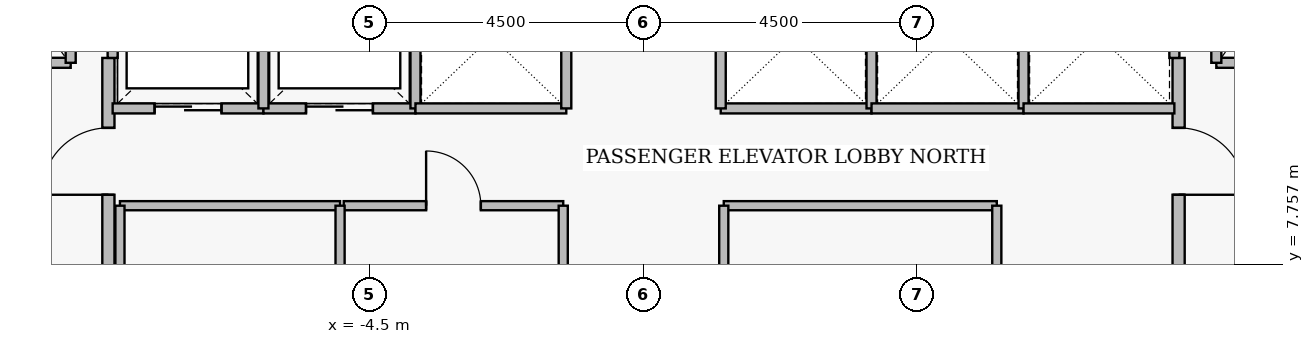
"""IFC4 building model, lengths in metres.
Left out: names, types, materials, properties, quantities, classifications, styles, units other than length and angle.
Written with IfcOpenShell. Run it as: python <this file> out.ifc"""

import sys

from ifc_helpers import new_model, si_unit, direction, frame, frame_2d, origin, place, context, subcontext, project, spatial, rectangle, extrude, element, fill, save


model = new_model("IFC4")
c1 = context("Model", 3, precision=1e-05, world=origin(), true_north=direction((0.0, 1.0)))
c2 = subcontext(c1, "Body", "Model", "MODEL_VIEW")
j1 = project(units=[si_unit("LENGTHUNIT", "METRE"), si_unit("PLANEANGLEUNIT", "RADIAN")], contexts=[c1])
p1 = place(None, origin())
s1 = spatial("IfcSite", under=j1, at=p1, CompositionType="ELEMENT")
p2 = place(p1, origin())
s2 = spatial("IfcBuilding", under=s1, at=p2, CompositionType="ELEMENT")
p3 = place(p2, frame((0.0, 0.0, 49.5)))
s3 = spatial("IfcBuildingStorey", under=s2, at=p3, CompositionType="ELEMENT", Elevation=49.5)
p4 = place(p3, frame((-8.8, 5.05, 0.0), z_axis=(0.0, 0.0, 1.0), x_axis=(0.0, 1.0, 0.0)))
e1 = element("IfcWall", 1, at=p4, inside=s3, PredefinedType="PARTITIONING", context=c2, shape_type="SweptSolid", body=[
    extrude(rectangle(XDim=6.1, YDim=0.2, at=frame_2d((3.05, 0.0))), origin(), (0.0, 0.0, 1.0), 3.43),
])
p5 = place(p4, frame((0.25, 0.0, 0.0)))
e2 = element("IfcOpeningElement", 2, at=p5, cuts=e1, PredefinedType="OPENING", context=c2, shape_type="SweptSolid", body=[
    extrude(rectangle(XDim=1.1, YDim=2.2, at=frame_2d((0.55, 1.1))), frame((0.0, 0.11, 0.0), z_axis=(0.0, -1.0, 0.0), x_axis=(1.0, 0.0, 0.0)), (0.0, 0.0, 1.0), 0.22),
])
p6 = place(p4, frame((3.85, 0.0, 0.0)))
e3 = element("IfcOpeningElement", 3, at=p6, cuts=e1, PredefinedType="OPENING", context=c2, shape_type="SweptSolid", body=[
    extrude(rectangle(XDim=1.1, YDim=2.2, at=frame_2d((0.55, 1.1))), frame((0.0, 0.11, 0.0), z_axis=(0.0, -1.0, 0.0), x_axis=(1.0, 0.0, 0.0)), (0.0, 0.0, 1.0), 0.22),
])
p7 = place(p3, frame((8.8, 11.15, 0.0), z_axis=(0.0, 0.0, 1.0), x_axis=(0.0, -1.0, 0.0)))
e4 = element("IfcWall", 4, at=p7, inside=s3, PredefinedType="PARTITIONING", context=c2, shape_type="SweptSolid", body=[
    extrude(rectangle(XDim=6.1, YDim=0.2, at=frame_2d((3.05, 0.0))), origin(), (0.0, 0.0, 1.0), 3.43),
])
p8 = place(p7, frame((1.15, 0.0, 0.0)))
e5 = element("IfcOpeningElement", 5, at=p8, cuts=e4, PredefinedType="OPENING", context=c2, shape_type="SweptSolid", body=[
    extrude(rectangle(XDim=1.1, YDim=2.2, at=frame_2d((0.55, 1.1))), frame((0.0, 0.11, 0.0), z_axis=(0.0, -1.0, 0.0), x_axis=(1.0, 0.0, 0.0)), (0.0, 0.0, 1.0), 0.22),
])
p9 = place(p7, frame((4.75, 0.0, 0.0)))
e6 = element("IfcOpeningElement", 6, at=p9, cuts=e4, PredefinedType="OPENING", context=c2, shape_type="SweptSolid", body=[
    extrude(rectangle(XDim=1.1, YDim=2.2, at=frame_2d((0.55, 1.1))), frame((0.0, 0.11, 0.0), z_axis=(0.0, -1.0, 0.0), x_axis=(1.0, 0.0, 0.0)), (0.0, 0.0, 1.0), 0.22),
])
p10 = place(p3, frame((-11.58, 11.07, 0.0), z_axis=(0.0, 0.0, 1.0), x_axis=(1.0, 0.0, 0.0)))
e7 = element("IfcWall", 7, at=p10, inside=s3, PredefinedType="PARTITIONING", context=c2, shape_type="SweptSolid", body=[
    extrude(rectangle(XDim=2.16, YDim=0.165, at=frame_2d((1.08, 0.0))), origin(), (0.0, 0.0, 1.0), 3.43),
])
p11 = place(p10, frame((0.53, 0.0, 0.0)))
e8 = element("IfcOpeningElement", 8, at=p11, cuts=e7, PredefinedType="OPENING", context=c2, shape_type="SweptSolid", body=[
    extrude(rectangle(XDim=1.15, YDim=2.25, at=frame_2d((0.575, 1.125))), frame((0.0, 0.093, 0.0), z_axis=(0.0, -1.0, 0.0), x_axis=(1.0, 0.0, 0.0)), (0.0, 0.0, 1.0), 0.185),
])
p12 = place(p3, frame((9.42, 11.07, 0.0), z_axis=(0.0, 0.0, 1.0), x_axis=(1.0, 0.0, 0.0)))
e9 = element("IfcWall", 9, at=p12, inside=s3, PredefinedType="PARTITIONING", context=c2, shape_type="SweptSolid", body=[
    extrude(rectangle(XDim=2.16, YDim=0.165, at=frame_2d((1.08, 0.0))), origin(), (0.0, 0.0, 1.0), 3.43),
])
p13 = place(p12, frame((0.53, 0.0, 0.0)))
e10 = element("IfcOpeningElement", 10, at=p13, cuts=e9, PredefinedType="OPENING", context=c2, shape_type="SweptSolid", body=[
    extrude(rectangle(XDim=1.15, YDim=2.25, at=frame_2d((0.575, 1.125))), frame((0.0, 0.093, 0.0), z_axis=(0.0, -1.0, 0.0), x_axis=(1.0, 0.0, 0.0)), (0.0, 0.0, 1.0), 0.185),
])
p14 = place(p3, frame((-8.73, 10.32, 0.0), z_axis=(0.0, 0.0, 1.0), x_axis=(1.0, 0.0, 0.0)))
e11 = element("IfcWall", 11, at=p14, inside=s3, PredefinedType="PARTITIONING", context=c2, shape_type="SweptSolid", body=[
    extrude(rectangle(XDim=2.48, YDim=0.165, at=frame_2d((1.24, 0.0))), origin(), (0.0, 0.0, 1.0), 3.43),
])
p15 = place(p14, frame((0.69, 0.0, 0.0)))
e12 = element("IfcOpeningElement", 12, at=p15, cuts=e11, PredefinedType="OPENING", context=c2, shape_type="SweptSolid", body=[
    extrude(rectangle(XDim=1.1, YDim=2.25, at=frame_2d((0.55, 1.125))), frame((0.0, 0.093, 0.0), z_axis=(0.0, -1.0, 0.0), x_axis=(1.0, 0.0, 0.0)), (0.0, 0.0, 1.0), 0.185),
])
p16 = place(p3, frame((-6.25, 10.32, 0.0), z_axis=(0.0, 0.0, 1.0), x_axis=(1.0, 0.0, 0.0)))
e13 = element("IfcWall", 13, at=p16, inside=s3, PredefinedType="PARTITIONING", context=c2, shape_type="SweptSolid", body=[
    extrude(rectangle(XDim=2.5, YDim=0.165, at=frame_2d((1.25, 0.0))), origin(), (0.0, 0.0, 1.0), 3.43),
])
p17 = place(p16, frame((0.7, 0.0, 0.0)))
e14 = element("IfcOpeningElement", 14, at=p17, cuts=e13, PredefinedType="OPENING", context=c2, shape_type="SweptSolid", body=[
    extrude(rectangle(XDim=1.1, YDim=2.25, at=frame_2d((0.55, 1.125))), frame((0.0, 0.093, 0.0), z_axis=(0.0, -1.0, 0.0), x_axis=(1.0, 0.0, 0.0)), (0.0, 0.0, 1.0), 0.185),
])
p18 = place(p3, frame((-4.93, 8.72, 0.0), z_axis=(0.0, 0.0, 1.0), x_axis=(1.0, 0.0, 0.0)))
e15 = element("IfcWall", 15, at=p18, inside=s3, PredefinedType="PARTITIONING", context=c2, shape_type="SweptSolid", body=[
    extrude(rectangle(XDim=3.61, YDim=0.15, at=frame_2d((1.805, 0.0))), origin(), (0.0, 0.0, 1.0), 3.43),
])
p19 = place(p18, frame((1.355, 0.0, 0.0)))
e16 = element("IfcOpeningElement", 16, at=p19, cuts=e15, PredefinedType="OPENING", context=c2, shape_type="SweptSolid", body=[
    extrude(rectangle(XDim=0.9, YDim=2.15, at=frame_2d((0.45, 1.075))), frame((0.0, 0.085, 0.0), z_axis=(0.0, -1.0, 0.0), x_axis=(1.0, 0.0, 0.0)), (0.0, 0.0, 1.0), 0.17),
])
for number, where, z_axis, x_axis in (
    (17, (-9.42, 11.07, 0.0), (0.0, 0.0, 1.0), (0.0, 1.0, 0.0)),
    (18, (9.42, 11.07, 0.0), (0.0, 0.0, 1.0), (0.0, 1.0, 0.0)),
):
    element("IfcWall", number, at=place(p3, frame(where, z_axis=z_axis, x_axis=x_axis)), inside=s3, PredefinedType="PARTITIONING", context=c2, shape_type="SweptSolid", body=[
        extrude(rectangle(XDim=2.96, YDim=0.165, at=frame_2d((1.48, 0.0))), origin(), (0.0, 0.0, 1.0), 3.43),
    ])
p20 = place(p3, frame((-8.73, 11.15, 0.0), z_axis=(0.0, 0.0, 1.0), x_axis=(0.0, 1.0, 0.0)))
e19 = element("IfcWall", 19, at=p20, inside=s3, PredefinedType="PARTITIONING", context=c2, shape_type="SweptSolid", body=[
    extrude(rectangle(XDim=1.53, YDim=0.165, at=frame_2d((0.765, 0.0))), origin(), (0.0, 0.0, 1.0), 3.43),
])
for number, where, z_axis, x_axis in (
    (20, (-6.25, 10.32, 0.0), (0.0, 0.0, 1.0), (0.0, 1.0, 0.0)),
    (21, (-3.75, 10.32, 0.0), (0.0, 0.0, 1.0), (0.0, 1.0, 0.0)),
):
    element("IfcWall", number, at=place(p3, frame(where, z_axis=z_axis, x_axis=x_axis)), inside=s3, PredefinedType="PARTITIONING", context=c2, shape_type="SweptSolid", body=[
        extrude(rectangle(XDim=2.36, YDim=0.165, at=frame_2d((1.18, 0.0))), origin(), (0.0, 0.0, 1.0), 3.43),
    ])
p21 = place(p3, frame((-3.75, 10.32, 0.0), z_axis=(0.0, 0.0, 1.0), x_axis=(1.0, 0.0, 0.0)))
e22 = element("IfcWall", 22, at=p21, inside=s3, PredefinedType="PARTITIONING", context=c2, shape_type="SweptSolid", body=[
    extrude(rectangle(XDim=2.48, YDim=0.165, at=frame_2d((1.24, 0.0))), origin(), (0.0, 0.0, 1.0), 3.43),
])
p22 = place(p3, frame((-1.27, 10.32, 0.0), z_axis=(0.0, 0.0, 1.0), x_axis=(0.0, 1.0, 0.0)))
e23 = element("IfcWall", 23, at=p22, inside=s3, PredefinedType="PARTITIONING", context=c2, shape_type="SweptSolid", body=[
    extrude(rectangle(XDim=2.36, YDim=0.165, at=frame_2d((1.18, 0.0))), origin(), (0.0, 0.0, 1.0), 3.43),
])
p23 = place(p3, frame((1.27, 10.32, 0.0), z_axis=(0.0, 0.0, 1.0), x_axis=(1.0, 0.0, 0.0)))
e24 = element("IfcWall", 24, at=p23, inside=s3, PredefinedType="PARTITIONING", context=c2, shape_type="SweptSolid", body=[
    extrude(rectangle(XDim=2.48, YDim=0.165, at=frame_2d((1.24, 0.0))), origin(), (0.0, 0.0, 1.0), 3.43),
])
for number, where, z_axis, x_axis in (
    (25, (1.27, 10.32, 0.0), (0.0, 0.0, 1.0), (0.0, 1.0, 0.0)),
    (26, (3.75, 10.32, 0.0), (0.0, 0.0, 1.0), (0.0, 1.0, 0.0)),
):
    element("IfcWall", number, at=place(p3, frame(where, z_axis=z_axis, x_axis=x_axis)), inside=s3, PredefinedType="PARTITIONING", context=c2, shape_type="SweptSolid", body=[
        extrude(rectangle(XDim=2.36, YDim=0.165, at=frame_2d((1.18, 0.0))), origin(), (0.0, 0.0, 1.0), 3.43),
    ])
p24 = place(p3, frame((3.75, 10.32, 0.0), z_axis=(0.0, 0.0, 1.0), x_axis=(1.0, 0.0, 0.0)))
e27 = element("IfcWall", 27, at=p24, inside=s3, PredefinedType="PARTITIONING", context=c2, shape_type="SweptSolid", body=[
    extrude(rectangle(XDim=2.5, YDim=0.165, at=frame_2d((1.25, 0.0))), origin(), (0.0, 0.0, 1.0), 3.43),
])
p25 = place(p3, frame((6.25, 10.32, 0.0), z_axis=(0.0, 0.0, 1.0), x_axis=(0.0, 1.0, 0.0)))
e28 = element("IfcWall", 28, at=p25, inside=s3, PredefinedType="PARTITIONING", context=c2, shape_type="SweptSolid", body=[
    extrude(rectangle(XDim=2.36, YDim=0.165, at=frame_2d((1.18, 0.0))), origin(), (0.0, 0.0, 1.0), 3.43),
])
p26 = place(p3, frame((6.25, 10.32, 0.0), z_axis=(0.0, 0.0, 1.0), x_axis=(1.0, 0.0, 0.0)))
e29 = element("IfcWall", 29, at=p26, inside=s3, PredefinedType="PARTITIONING", context=c2, shape_type="SweptSolid", body=[
    extrude(rectangle(XDim=2.48, YDim=0.165, at=frame_2d((1.24, 0.0))), origin(), (0.0, 0.0, 1.0), 3.43),
])
p27 = place(p3, frame((8.73, 11.15, 0.0), z_axis=(0.0, 0.0, 1.0), x_axis=(0.0, 1.0, 0.0)))
e30 = element("IfcWall", 30, at=p27, inside=s3, PredefinedType="PARTITIONING", context=c2, shape_type="SweptSolid", body=[
    extrude(rectangle(XDim=1.53, YDim=0.165, at=frame_2d((0.765, 0.0))), origin(), (0.0, 0.0, 1.0), 3.43),
])
p28 = place(p3, frame((-8.61, 8.72, 0.0), z_axis=(0.0, 0.0, 1.0), x_axis=(1.0, 0.0, 0.0)))
e31 = element("IfcWall", 31, at=p28, inside=s3, PredefinedType="PARTITIONING", context=c2, shape_type="SweptSolid", body=[
    extrude(rectangle(XDim=3.62, YDim=0.15, at=frame_2d((1.81, 0.0))), origin(), (0.0, 0.0, 1.0), 3.43),
])
for number, where, z_axis, x_axis in (
    (32, (-8.61, 6.48, 0.0), (0.0, 0.0, 1.0), (0.0, 1.0, 0.0)),
    (33, (-4.99, 6.48, 0.0), (0.0, 0.0, 1.0), (0.0, 1.0, 0.0)),
    (34, (-1.32, 6.48, 0.0), (0.0, 0.0, 1.0), (0.0, 1.0, 0.0)),
):
    element("IfcWall", number, at=place(p3, frame(where, z_axis=z_axis, x_axis=x_axis)), inside=s3, PredefinedType="PARTITIONING", context=c2, shape_type="SweptSolid", body=[
        extrude(rectangle(XDim=2.24, YDim=0.15, at=frame_2d((1.12, 0.0))), origin(), (0.0, 0.0, 1.0), 3.43),
    ])
p29 = place(p3, frame((1.32, 8.72, 0.0), z_axis=(0.0, 0.0, 1.0), x_axis=(1.0, 0.0, 0.0)))
e35 = element("IfcWall", 35, at=p29, inside=s3, PredefinedType="PARTITIONING", context=c2, shape_type="SweptSolid", body=[
    extrude(rectangle(XDim=4.49, YDim=0.15, at=frame_2d((2.245, 0.0))), origin(), (0.0, 0.0, 1.0), 3.43),
])
for number, where, z_axis, x_axis in (
    (36, (1.32, 6.48, 0.0), (0.0, 0.0, 1.0), (0.0, 1.0, 0.0)),
    (37, (5.81, 6.48, 0.0), (0.0, 0.0, 1.0), (0.0, 1.0, 0.0)),
):
    element("IfcWall", number, at=place(p3, frame(where, z_axis=z_axis, x_axis=x_axis)), inside=s3, PredefinedType="PARTITIONING", context=c2, shape_type="SweptSolid", body=[
        extrude(rectangle(XDim=2.24, YDim=0.15, at=frame_2d((1.12, 0.0))), origin(), (0.0, 0.0, 1.0), 3.43),
    ])
p30 = place(p6, origin())
e38 = element("IfcDoor", 38, at=p30, inside=s3, OperationType="SINGLE_SWING_LEFT", PredefinedType="DOOR", context=c2, shape_type="SweptSolid", body=[
    extrude(rectangle(XDim=1.1, YDim=2.2, at=frame_2d((0.55, 1.1))), frame((0.0, 0.025, 0.0), z_axis=(0.0, -1.0, 0.0), x_axis=(1.0, 0.0, 0.0)), (0.0, 0.0, 1.0), 0.05),
])
fill(e3, e38)
p31 = place(p8, origin())
e39 = element("IfcDoor", 39, at=p31, inside=s3, OperationType="SINGLE_SWING_RIGHT", PredefinedType="DOOR", context=c2, shape_type="SweptSolid", body=[
    extrude(rectangle(XDim=1.1, YDim=2.2, at=frame_2d((0.55, 1.1))), frame((0.0, 0.025, 0.0), z_axis=(0.0, -1.0, 0.0), x_axis=(1.0, 0.0, 0.0)), (0.0, 0.0, 1.0), 0.05),
])
fill(e5, e39)
p32 = place(p15, origin())
e40 = element("IfcDoor", 40, at=p32, inside=s3, OperationType="SLIDING_TO_LEFT", PredefinedType="DOOR", context=c2, shape_type="SweptSolid", body=[
    extrude(rectangle(XDim=1.1, YDim=2.25, at=frame_2d((0.55, 1.125))), frame((0.0, 0.025, 0.0), z_axis=(0.0, -1.0, 0.0), x_axis=(1.0, 0.0, 0.0)), (0.0, 0.0, 1.0), 0.05),
])
fill(e12, e40)
p33 = place(p17, origin())
e41 = element("IfcDoor", 41, at=p33, inside=s3, OperationType="SLIDING_TO_LEFT", PredefinedType="DOOR", context=c2, shape_type="SweptSolid", body=[
    extrude(rectangle(XDim=1.1, YDim=2.25, at=frame_2d((0.55, 1.125))), frame((0.0, 0.025, 0.0), z_axis=(0.0, -1.0, 0.0), x_axis=(1.0, 0.0, 0.0)), (0.0, 0.0, 1.0), 0.05),
])
fill(e14, e41)
p34 = place(p19, origin())
e42 = element("IfcDoor", 42, at=p34, inside=s3, OperationType="SINGLE_SWING_LEFT", PredefinedType="DOOR", context=c2, shape_type="SweptSolid", body=[
    extrude(rectangle(XDim=0.9, YDim=2.15, at=frame_2d((0.45, 1.075))), frame((0.0, 0.025, 0.0), z_axis=(0.0, -1.0, 0.0), x_axis=(1.0, 0.0, 0.0)), (0.0, 0.0, 1.0), 0.05),
])
fill(e16, e42)
save(model, sys.argv[1])
